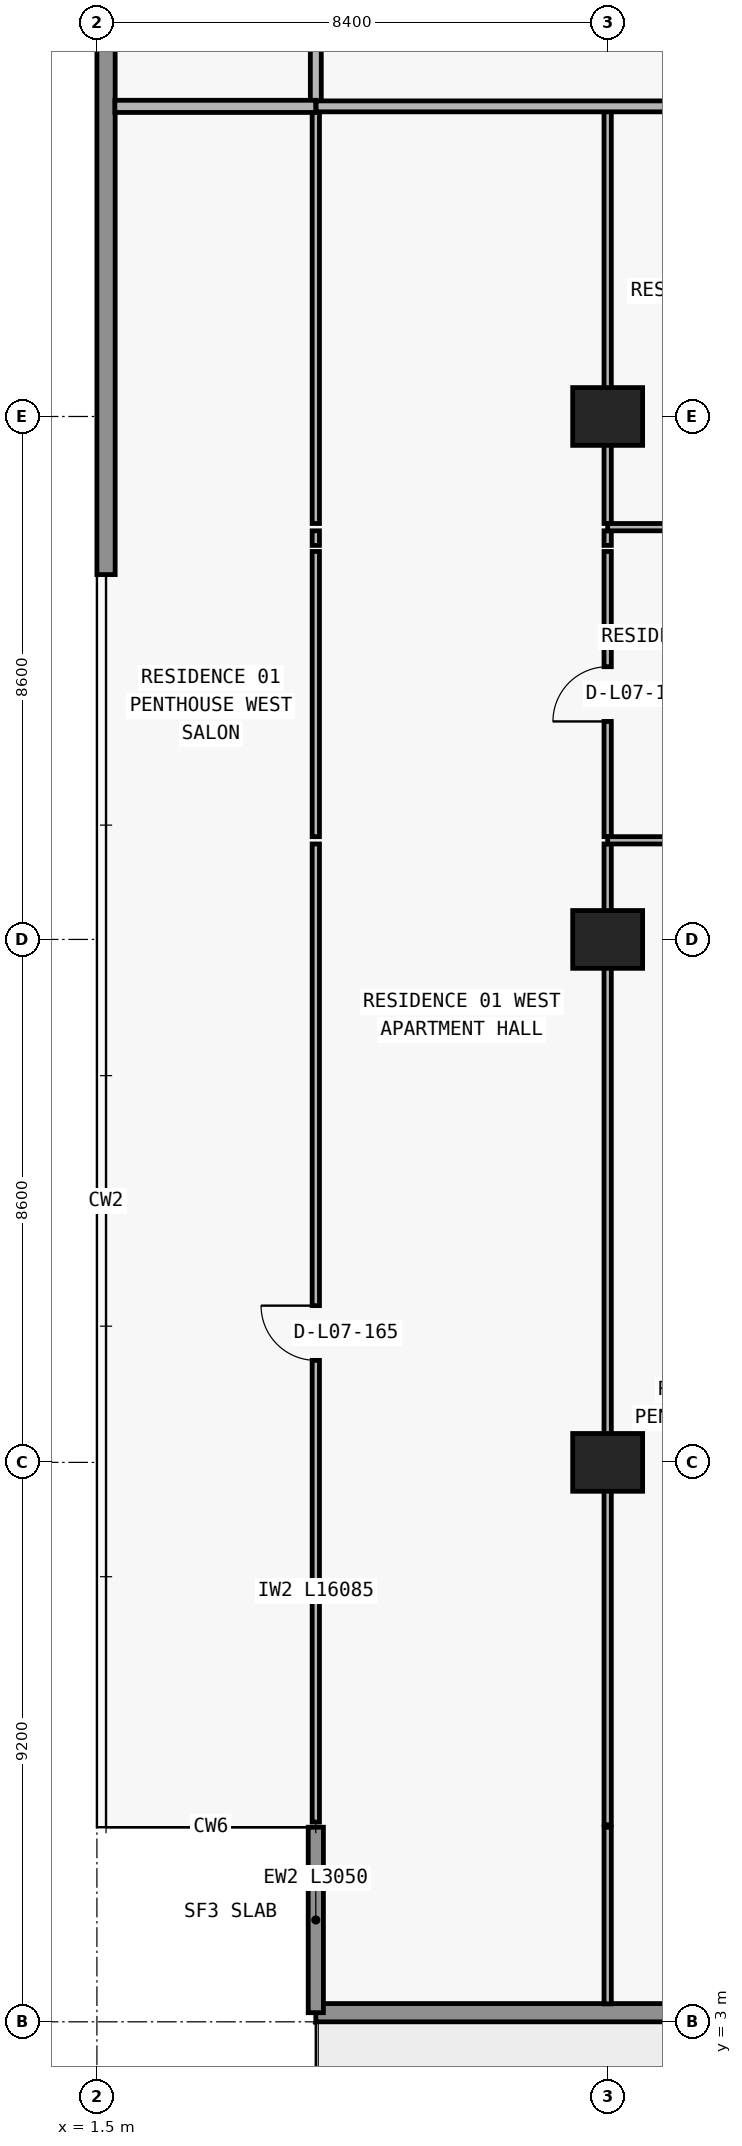
"""IFC4 building model, lengths in metres.
Left out: names, types, materials, properties, quantities, classifications, styles, units other than length and angle.
Written with IfcOpenShell. Run it as: python <this file> out.ifc"""

import sys

from ifc_helpers import new_model, si_unit, direction, frame, frame_2d, origin, origin_2d, place, context, subcontext, project, spatial, rectangle, extrude, element, fill, save


model = new_model("IFC4")
c1 = context("Model", 3, precision=1e-05, world=origin(), true_north=direction((0.0, 1.0)))
c2 = subcontext(c1, "Body", "Model", "MODEL_VIEW")
j1 = project(units=[si_unit("LENGTHUNIT", "METRE"), si_unit("PLANEANGLEUNIT", "RADIAN")], contexts=[c1])
p1 = place(None, origin())
s1 = spatial("IfcSite", under=j1, at=p1, CompositionType="ELEMENT")
p2 = place(p1, origin())
s2 = spatial("IfcBuilding", under=s1, at=p2, CompositionType="ELEMENT")
p3 = place(p2, frame((0.0, 0.0, 33.3)))
s3 = spatial("IfcBuildingStorey", under=s2, at=p3, CompositionType="ELEMENT", Elevation=33.3)
for number, where, z_axis, x_axis in (
    (1, (9.9, 12.2, 0.0), (0.0, 0.0, 1.0), (1.0, 0.0, 0.0)),
    (2, (9.9, 20.8, 0.0), (0.0, 0.0, 1.0), (1.0, 0.0, 0.0)),
    (3, (9.9, 29.4, 0.0), (0.0, 0.0, 1.0), (1.0, 0.0, 0.0)),
):
    element("IfcColumn", number, at=place(p3, frame(where, z_axis=z_axis, x_axis=x_axis)), inside=s3, PredefinedType="COLUMN", context=c2, shape_type="SweptSolid", body=[
        extrude(rectangle(XDim=1.15, YDim=0.95, at=origin_2d()), origin(), (0.0, 0.0, 1.0), 3.05),
    ])
p4 = place(p3, frame((72.7, 3.15, 0.0), z_axis=(0.0, 0.0, 1.0), x_axis=(-1.0, 0.0, 0.0)))
e4 = element("IfcWall", 4, at=p4, inside=s3, PredefinedType="STANDARD", context=c2, shape_type="SweptSolid", body=[
    extrude(rectangle(XDim=67.6, YDim=0.3, at=frame_2d((33.8, 0.0))), origin(), (0.0, 0.0, 1.0), 3.05),
])
p5 = place(p4, frame((59.826, 0.0, 0.0)))
e5 = element("IfcOpeningElement", 5, at=p5, cuts=e4, PredefinedType="OPENING", context=c2, shape_type="SweptSolid", body=[
    extrude(rectangle(XDim=2.0, YDim=2.3, at=frame_2d((1.0, 1.15))), frame((0.0, 0.16, 0.0), z_axis=(0.0, -1.0, 0.0), x_axis=(1.0, 0.0, 0.0)), (0.0, 0.0, 1.0), 0.32),
])
p6 = place(p4, frame((55.526, 0.0, 0.85)))
e6 = element("IfcOpeningElement", 6, at=p6, cuts=e4, PredefinedType="OPENING", context=c2, shape_type="SweptSolid", body=[
    extrude(rectangle(XDim=2.2, YDim=1.55, at=frame_2d((1.1, 0.775))), frame((0.0, 0.16, 0.0), z_axis=(0.0, -1.0, 0.0), x_axis=(1.0, 0.0, 0.0)), (0.0, 0.0, 1.0), 0.32),
])
p7 = place(p4, frame((51.09, 0.0, 0.0)))
e7 = element("IfcOpeningElement", 7, at=p7, cuts=e4, PredefinedType="OPENING", context=c2, shape_type="SweptSolid", body=[
    extrude(rectangle(XDim=2.0, YDim=2.3, at=frame_2d((1.0, 1.15))), frame((0.0, 0.16, 0.0), z_axis=(0.0, -1.0, 0.0), x_axis=(1.0, 0.0, 0.0)), (0.0, 0.0, 1.0), 0.32),
])
p8 = place(p4, frame((46.99, 0.0, 0.85)))
e8 = element("IfcOpeningElement", 8, at=p8, cuts=e4, PredefinedType="OPENING", context=c2, shape_type="SweptSolid", body=[
    extrude(rectangle(XDim=1.8, YDim=1.55, at=frame_2d((0.9, 0.775))), frame((0.0, 0.16, 0.0), z_axis=(0.0, -1.0, 0.0), x_axis=(1.0, 0.0, 0.0)), (0.0, 0.0, 1.0), 0.32),
])
p9 = place(p4, frame((43.026, 0.0, 0.0)))
e9 = element("IfcOpeningElement", 9, at=p9, cuts=e4, PredefinedType="OPENING", context=c2, shape_type="SweptSolid", body=[
    extrude(rectangle(XDim=2.0, YDim=2.3, at=frame_2d((1.0, 1.15))), frame((0.0, 0.16, 0.0), z_axis=(0.0, -1.0, 0.0), x_axis=(1.0, 0.0, 0.0)), (0.0, 0.0, 1.0), 0.32),
])
p10 = place(p4, frame((38.726, 0.0, 0.85)))
e10 = element("IfcOpeningElement", 10, at=p10, cuts=e4, PredefinedType="OPENING", context=c2, shape_type="SweptSolid", body=[
    extrude(rectangle(XDim=2.2, YDim=1.55, at=frame_2d((1.1, 0.775))), frame((0.0, 0.16, 0.0), z_axis=(0.0, -1.0, 0.0), x_axis=(1.0, 0.0, 0.0)), (0.0, 0.0, 1.0), 0.32),
])
p11 = place(p4, frame((34.69, 0.0, 0.0)))
e11 = element("IfcOpeningElement", 11, at=p11, cuts=e4, PredefinedType="OPENING", context=c2, shape_type="SweptSolid", body=[
    extrude(rectangle(XDim=2.0, YDim=2.3, at=frame_2d((1.0, 1.15))), frame((0.0, 0.16, 0.0), z_axis=(0.0, -1.0, 0.0), x_axis=(1.0, 0.0, 0.0)), (0.0, 0.0, 1.0), 0.32),
])
p12 = place(p4, frame((30.81, 0.0, 0.65)))
e12 = element("IfcOpeningElement", 12, at=p12, cuts=e4, PredefinedType="OPENING", context=c2, shape_type="SweptSolid", body=[
    extrude(rectangle(XDim=2.6, YDim=1.85, at=frame_2d((1.3, 0.925))), frame((0.0, 0.16, 0.0), z_axis=(0.0, -1.0, 0.0), x_axis=(1.0, 0.0, 0.0)), (0.0, 0.0, 1.0), 0.32),
])
p13 = place(p4, frame((24.7, 0.0, 0.85)))
e13 = element("IfcOpeningElement", 13, at=p13, cuts=e4, PredefinedType="OPENING", context=c2, shape_type="SweptSolid", body=[
    extrude(rectangle(XDim=2.2, YDim=1.55, at=frame_2d((1.1, 0.775))), frame((0.0, 0.16, 0.0), z_axis=(0.0, -1.0, 0.0), x_axis=(1.0, 0.0, 0.0)), (0.0, 0.0, 1.0), 0.32),
])
p14 = place(p4, frame((18.626, 0.0, 0.0)))
e14 = element("IfcOpeningElement", 14, at=p14, cuts=e4, PredefinedType="OPENING", context=c2, shape_type="SweptSolid", body=[
    extrude(rectangle(XDim=2.0, YDim=2.3, at=frame_2d((1.0, 1.15))), frame((0.0, 0.16, 0.0), z_axis=(0.0, -1.0, 0.0), x_axis=(1.0, 0.0, 0.0)), (0.0, 0.0, 1.0), 0.32),
])
p15 = place(p4, frame((14.326, 0.0, 0.85)))
e15 = element("IfcOpeningElement", 15, at=p15, cuts=e4, PredefinedType="OPENING", context=c2, shape_type="SweptSolid", body=[
    extrude(rectangle(XDim=2.2, YDim=1.55, at=frame_2d((1.1, 0.775))), frame((0.0, 0.16, 0.0), z_axis=(0.0, -1.0, 0.0), x_axis=(1.0, 0.0, 0.0)), (0.0, 0.0, 1.0), 0.32),
])
p16 = place(p4, frame((9.89, 0.0, 0.0)))
e16 = element("IfcOpeningElement", 16, at=p16, cuts=e4, PredefinedType="OPENING", context=c2, shape_type="SweptSolid", body=[
    extrude(rectangle(XDim=2.0, YDim=2.3, at=frame_2d((1.0, 1.15))), frame((0.0, 0.16, 0.0), z_axis=(0.0, -1.0, 0.0), x_axis=(1.0, 0.0, 0.0)), (0.0, 0.0, 1.0), 0.32),
])
p17 = place(p4, frame((5.79, 0.0, 0.85)))
e17 = element("IfcOpeningElement", 17, at=p17, cuts=e4, PredefinedType="OPENING", context=c2, shape_type="SweptSolid", body=[
    extrude(rectangle(XDim=1.8, YDim=1.55, at=frame_2d((0.9, 0.775))), frame((0.0, 0.16, 0.0), z_axis=(0.0, -1.0, 0.0), x_axis=(1.0, 0.0, 0.0)), (0.0, 0.0, 1.0), 0.32),
])
p18 = place(p3, frame((5.1, 6.2, 0.0), z_axis=(0.0, 0.0, 1.0), x_axis=(0.0, -1.0, 0.0)))
e18 = element("IfcWall", 18, at=p18, inside=s3, PredefinedType="ELEMENTEDWALL", context=c2, shape_type="SweptSolid", body=[
    extrude(rectangle(XDim=3.05, YDim=0.25, at=frame_2d((1.525, 0.0))), origin(), (0.0, 0.0, 1.0), 3.05),
])
p19 = place(p3, frame((1.65, 26.8, 0.0), z_axis=(0.0, 0.0, 1.0), x_axis=(0.0, 1.0, 0.0)))
e19 = element("IfcWall", 19, at=p19, inside=s3, PredefinedType="STANDARD", context=c2, shape_type="SweptSolid", body=[
    extrude(rectangle(XDim=20.6, YDim=0.3, at=frame_2d((10.3, 0.0))), origin(), (0.0, 0.0, 1.0), 3.05),
])
p20 = place(p3, frame((5.1, 6.285, 0.0), z_axis=(0.0, 0.0, 1.0), x_axis=(0.0, 1.0, 0.0)))
e20 = element("IfcWall", 20, at=p20, inside=s3, PredefinedType="PARTITIONING", context=c2, shape_type="SweptSolid", body=[
    extrude(rectangle(XDim=16.085, YDim=0.12, at=frame_2d((8.042, 0.0))), origin(), (0.0, 0.0, 1.0), 3.05),
])
p21 = place(p20, frame((7.593, 0.0, 0.0)))
e21 = element("IfcOpeningElement", 21, at=p21, cuts=e20, PredefinedType="OPENING", context=c2, shape_type="SweptSolid", body=[
    extrude(rectangle(XDim=0.9, YDim=2.15, at=frame_2d((0.45, 1.075))), frame((0.0, 0.07, 0.0), z_axis=(0.0, -1.0, 0.0), x_axis=(1.0, 0.0, 0.0)), (0.0, 0.0, 1.0), 0.14),
])
p22 = place(p3, frame((5.1, 22.49, 0.0), z_axis=(0.0, 0.0, 1.0), x_axis=(0.0, 1.0, 0.0)))
e22 = element("IfcWall", 22, at=p22, inside=s3, PredefinedType="PARTITIONING", context=c2, shape_type="SweptSolid", body=[
    extrude(rectangle(XDim=4.69, YDim=0.12, at=frame_2d((2.345, 0.0))), origin(), (0.0, 0.0, 1.0), 3.05),
])
p23 = place(p3, frame((5.1, 27.28, 0.0), z_axis=(0.0, 0.0, 1.0), x_axis=(0.0, 1.0, 0.0)))
e23 = element("IfcWall", 23, at=p23, inside=s3, PredefinedType="PARTITIONING", context=c2, shape_type="SweptSolid", body=[
    extrude(rectangle(XDim=0.24, YDim=0.12, at=frame_2d((0.12, 0.0))), origin(), (0.0, 0.0, 1.0), 3.05),
])
p24 = place(p3, frame((5.1, 27.64, 0.0), z_axis=(0.0, 0.0, 1.0), x_axis=(0.0, 1.0, 0.0)))
e24 = element("IfcWall", 24, at=p24, inside=s3, PredefinedType="PARTITIONING", context=c2, shape_type="SweptSolid", body=[
    extrude(rectangle(XDim=6.86, YDim=0.12, at=frame_2d((3.43, 0.0))), origin(), (0.0, 0.0, 1.0), 3.05),
])
p25 = place(p3, frame((5.1, 34.505, 0.0), z_axis=(0.0, 0.0, 1.0), x_axis=(0.0, 1.0, 0.0)))
e25 = element("IfcWall", 25, at=p25, inside=s3, PredefinedType="PARTITIONING", context=c2, shape_type="SweptSolid", body=[
    extrude(rectangle(XDim=2.395, YDim=0.18, at=frame_2d((1.198, 0.0))), origin(), (0.0, 0.0, 1.0), 3.05),
])
p26 = place(p3, frame((9.9, 3.295, 0.0), z_axis=(0.0, 0.0, 1.0), x_axis=(0.0, 1.0, 0.0)))
e26 = element("IfcWall", 26, at=p26, inside=s3, PredefinedType="PARTITIONING", context=c2, shape_type="SweptSolid", body=[
    extrude(rectangle(XDim=2.905, YDim=0.12, at=frame_2d((1.453, 0.0))), origin(), (0.0, 0.0, 1.0), 3.05),
])
p27 = place(p3, frame((9.9, 6.24, 0.0), z_axis=(0.0, 0.0, 1.0), x_axis=(0.0, 1.0, 0.0)))
e27 = element("IfcWall", 27, at=p27, inside=s3, PredefinedType="PARTITIONING", context=c2, shape_type="SweptSolid", body=[
    extrude(rectangle(XDim=16.13, YDim=0.12, at=frame_2d((8.065, 0.0))), origin(), (0.0, 0.0, 1.0), 2.11),
])
p28 = place(p3, frame((9.9, 22.49, 0.0), z_axis=(0.0, 0.0, 1.0), x_axis=(0.0, 1.0, 0.0)))
e28 = element("IfcWall", 28, at=p28, inside=s3, PredefinedType="PARTITIONING", context=c2, shape_type="SweptSolid", body=[
    extrude(rectangle(XDim=4.69, YDim=0.12, at=frame_2d((2.345, 0.0))), origin(), (0.0, 0.0, 1.0), 2.11),
])
p29 = place(p28, frame((1.895, 0.0, 0.0)))
e29 = element("IfcOpeningElement", 29, at=p29, cuts=e28, PredefinedType="OPENING", context=c2, shape_type="SweptSolid", body=[
    extrude(rectangle(XDim=0.9, YDim=2.06, at=frame_2d((0.45, 1.03))), frame((0.0, 0.07, 0.0), z_axis=(0.0, -1.0, 0.0), x_axis=(1.0, 0.0, 0.0)), (0.0, 0.0, 1.0), 0.14),
])
p30 = place(p3, frame((9.9, 27.28, 0.0), z_axis=(0.0, 0.0, 1.0), x_axis=(0.0, 1.0, 0.0)))
e30 = element("IfcWall", 30, at=p30, inside=s3, PredefinedType="PARTITIONING", context=c2, shape_type="SweptSolid", body=[
    extrude(rectangle(XDim=0.24, YDim=0.12, at=frame_2d((0.12, 0.0))), origin(), (0.0, 0.0, 1.0), 2.11),
])
p31 = place(p3, frame((9.9, 27.64, 0.0), z_axis=(0.0, 0.0, 1.0), x_axis=(0.0, 1.0, 0.0)))
e31 = element("IfcWall", 31, at=p31, inside=s3, PredefinedType="PARTITIONING", context=c2, shape_type="SweptSolid", body=[
    extrude(rectangle(XDim=6.86, YDim=0.12, at=frame_2d((3.43, 0.0))), origin(), (0.0, 0.0, 1.0), 2.11),
])
p32 = place(p3, frame((9.9, 22.43, 0.0), z_axis=(0.0, 0.0, 1.0), x_axis=(1.0, 0.0, 0.0)))
e32 = element("IfcWall", 32, at=p32, inside=s3, PredefinedType="PARTITIONING", context=c2, shape_type="SweptSolid", body=[
    extrude(rectangle(XDim=8.4, YDim=0.12, at=frame_2d((4.2, 0.0))), origin(), (0.0, 0.0, 1.0), 3.05),
])
p33 = place(p32, frame((1.524, 0.0, 0.0)))
e33 = element("IfcOpeningElement", 33, at=p33, cuts=e32, PredefinedType="OPENING", context=c2, shape_type="SweptSolid", body=[
    extrude(rectangle(XDim=0.9, YDim=2.15, at=frame_2d((0.45, 1.075))), frame((0.0, 0.07, 0.0), z_axis=(0.0, -1.0, 0.0), x_axis=(1.0, 0.0, 0.0)), (0.0, 0.0, 1.0), 0.14),
])
p34 = place(p32, frame((6.018, 0.0, 0.0)))
e34 = element("IfcOpeningElement", 34, at=p34, cuts=e32, PredefinedType="OPENING", context=c2, shape_type="SweptSolid", body=[
    extrude(rectangle(XDim=0.9, YDim=2.15, at=frame_2d((0.45, 1.075))), frame((0.0, 0.07, 0.0), z_axis=(0.0, -1.0, 0.0), x_axis=(1.0, 0.0, 0.0)), (0.0, 0.0, 1.0), 0.14),
])
p35 = place(p3, frame((9.9, 27.58, 0.0), z_axis=(0.0, 0.0, 1.0), x_axis=(1.0, 0.0, 0.0)))
e35 = element("IfcWall", 35, at=p35, inside=s3, PredefinedType="PARTITIONING", context=c2, shape_type="SweptSolid", body=[
    extrude(rectangle(XDim=8.4, YDim=0.12, at=frame_2d((4.2, 0.0))), origin(), (0.0, 0.0, 1.0), 3.05),
])
p36 = place(p35, frame((1.818, 0.0, 0.0)))
e36 = element("IfcOpeningElement", 36, at=p36, cuts=e35, PredefinedType="OPENING", context=c2, shape_type="SweptSolid", body=[
    extrude(rectangle(XDim=0.9, YDim=2.15, at=frame_2d((0.45, 1.075))), frame((0.0, 0.07, 0.0), z_axis=(0.0, -1.0, 0.0), x_axis=(1.0, 0.0, 0.0)), (0.0, 0.0, 1.0), 0.14),
])
p37 = place(p3, frame((1.795, 34.5, 0.0), z_axis=(0.0, 0.0, 1.0), x_axis=(1.0, 0.0, 0.0)))
e37 = element("IfcWall", 37, at=p37, inside=s3, PredefinedType="PARTITIONING", context=c2, shape_type="SweptSolid", body=[
    extrude(rectangle(XDim=3.305, YDim=0.2, at=frame_2d((1.653, 0.0))), origin(), (0.0, 0.0, 1.0), 3.05),
])
p38 = place(p3, frame((5.105, 34.5, 0.0), z_axis=(0.0, 0.0, 1.0), x_axis=(1.0, 0.0, 0.0)))
e38 = element("IfcWall", 38, at=p38, inside=s3, PredefinedType="PARTITIONING", context=c2, shape_type="SweptSolid", body=[
    extrude(rectangle(XDim=50.781, YDim=0.18, at=frame_2d((25.391, 0.0))), origin(), (0.0, 0.0, 1.0), 3.05),
])
p39 = place(p38, frame((7.67, 0.0, 0.0)))
e39 = element("IfcOpeningElement", 39, at=p39, cuts=e38, PredefinedType="OPENING", context=c2, shape_type="SweptSolid", body=[
    extrude(rectangle(XDim=1.0, YDim=2.2, at=frame_2d((0.5, 1.1))), frame((0.0, 0.1, 0.0), z_axis=(0.0, -1.0, 0.0), x_axis=(1.0, 0.0, 0.0)), (0.0, 0.0, 1.0), 0.2),
])
p40 = place(p38, frame((16.07, 0.0, 0.0)))
e40 = element("IfcOpeningElement", 40, at=p40, cuts=e38, PredefinedType="OPENING", context=c2, shape_type="SweptSolid", body=[
    extrude(rectangle(XDim=1.0, YDim=2.2, at=frame_2d((0.5, 1.1))), frame((0.0, 0.1, 0.0), z_axis=(0.0, -1.0, 0.0), x_axis=(1.0, 0.0, 0.0)), (0.0, 0.0, 1.0), 0.2),
])
p41 = place(p38, frame((24.47, 0.0, 0.0)))
e41 = element("IfcOpeningElement", 41, at=p41, cuts=e38, PredefinedType="OPENING", context=c2, shape_type="SweptSolid", body=[
    extrude(rectangle(XDim=1.0, YDim=2.2, at=frame_2d((0.5, 1.1))), frame((0.0, 0.1, 0.0), z_axis=(0.0, -1.0, 0.0), x_axis=(1.0, 0.0, 0.0)), (0.0, 0.0, 1.0), 0.2),
])
p42 = place(p38, frame((32.545, 0.0, 0.0)))
e42 = element("IfcOpeningElement", 42, at=p42, cuts=e38, PredefinedType="OPENING", context=c2, shape_type="SweptSolid", body=[
    extrude(rectangle(XDim=1.0, YDim=2.2, at=frame_2d((0.5, 1.1))), frame((0.0, 0.1, 0.0), z_axis=(0.0, -1.0, 0.0), x_axis=(1.0, 0.0, 0.0)), (0.0, 0.0, 1.0), 0.2),
])
p43 = place(p38, frame((47.888, 0.0, 0.0)))
e43 = element("IfcOpeningElement", 43, at=p43, cuts=e38, PredefinedType="OPENING", context=c2, shape_type="SweptSolid", body=[
    extrude(rectangle(XDim=1.0, YDim=2.2, at=frame_2d((0.5, 1.1))), frame((0.0, 0.1, 0.0), z_axis=(0.0, -1.0, 0.0), x_axis=(1.0, 0.0, 0.0)), (0.0, 0.0, 1.0), 0.2),
])
p44 = place(p29, origin())
e44 = element("IfcDoor", 44, at=p44, inside=s3, OperationType="SINGLE_SWING_LEFT", PredefinedType="DOOR", context=c2, shape_type="SweptSolid", body=[
    extrude(rectangle(XDim=0.9, YDim=2.06, at=frame_2d((0.45, 1.03))), frame((0.0, 0.025, 0.0), z_axis=(0.0, -1.0, 0.0), x_axis=(1.0, 0.0, 0.0)), (0.0, 0.0, 1.0), 0.05),
])
fill(e29, e44)
p45 = place(p21, origin())
e45 = element("IfcDoor", 45, at=p45, inside=s3, OperationType="SINGLE_SWING_RIGHT", PredefinedType="DOOR", context=c2, shape_type="SweptSolid", body=[
    extrude(rectangle(XDim=0.9, YDim=2.15, at=frame_2d((0.45, 1.075))), frame((0.0, 0.025, 0.0), z_axis=(0.0, -1.0, 0.0), x_axis=(1.0, 0.0, 0.0)), (0.0, 0.0, 1.0), 0.05),
])
fill(e21, e45)
save(model, sys.argv[1])
